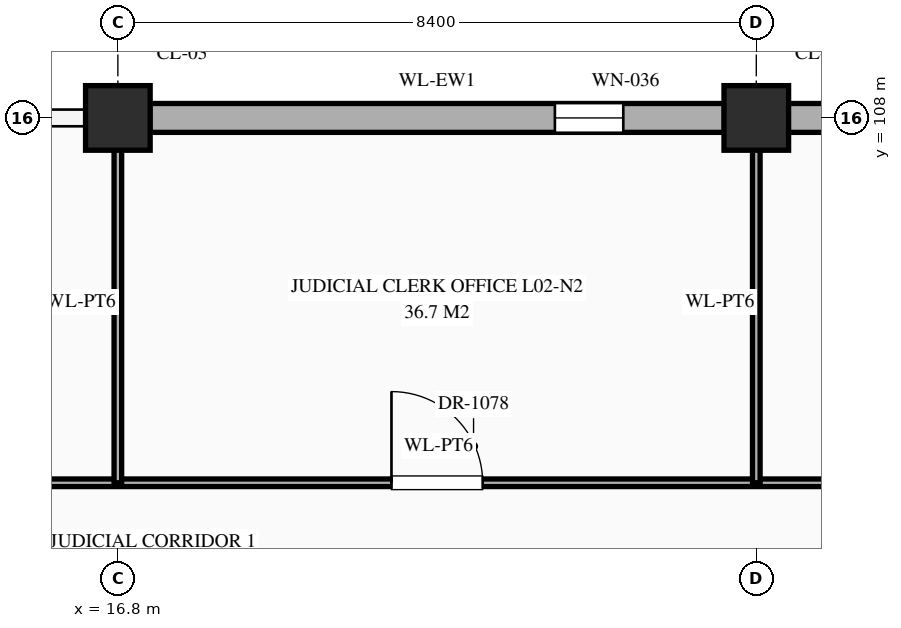
"""IFC4 building model, lengths in metres.
Left out: names, types, materials, properties, quantities, classifications, styles, units other than length and angle.
Written with IfcOpenShell. Run it as: python <this file> out.ifc"""

import sys

from ifc_helpers import new_model, si_unit, direction, frame, frame_2d, origin, origin_2d, place, context, subcontext, project, spatial, rectangle, extrude, element, fill, save


model = new_model("IFC4")
c1 = context("Model", 3, precision=1e-05, world=origin(), true_north=direction((0.0, 1.0)))
c2 = subcontext(c1, "Body", "Model", "MODEL_VIEW")
j1 = project(units=[si_unit("LENGTHUNIT", "METRE"), si_unit("PLANEANGLEUNIT", "RADIAN")], contexts=[c1])
p1 = place(None, origin())
s1 = spatial("IfcSite", under=j1, at=p1, CompositionType="ELEMENT")
p2 = place(p1, origin())
s2 = spatial("IfcBuilding", under=s1, at=p2, CompositionType="ELEMENT")
p3 = place(p2, frame((0.0, 0.0, 5.4)))
s3 = spatial("IfcBuildingStorey", under=s2, at=p3, CompositionType="ELEMENT", Elevation=5.4)
for number, where, z_axis, x_axis in (
    (1, (16.8, 108.0, 0.0), (0.0, 0.0, 1.0), (1.0, 0.0, 0.0)),
    (2, (25.2, 108.0, 0.0), (0.0, 0.0, 1.0), (1.0, 0.0, 0.0)),
):
    element("IfcColumn", number, at=place(p3, frame(where, z_axis=z_axis, x_axis=x_axis)), inside=s3, PredefinedType="COLUMN", context=c2, shape_type="SweptSolid", body=[
        extrude(rectangle(XDim=0.85, YDim=0.85, at=origin_2d()), origin(), (0.0, 0.0, 1.0), 5.4),
    ])
p4 = place(p3, frame((17.22, 108.0, 0.0), z_axis=(0.0, 0.0, 1.0), x_axis=(1.0, 0.0, 0.0)))
e3 = element("IfcWall", 3, at=p4, inside=s3, PredefinedType="STANDARD", context=c2, shape_type="SweptSolid", body=[
    extrude(rectangle(XDim=7.56, YDim=0.38, at=frame_2d((3.78, 0.0))), origin(), (0.0, 0.0, 1.0), 4.47),
])
p5 = place(p4, frame((5.33, 0.0, 0.85)))
e4 = element("IfcOpeningElement", 4, at=p5, cuts=e3, PredefinedType="OPENING", context=c2, shape_type="SweptSolid", body=[
    extrude(rectangle(XDim=0.9, YDim=1.2, at=frame_2d((0.45, 0.6))), frame((0.0, 0.202, 0.0), z_axis=(0.0, -1.0, 0.0), x_axis=(1.0, 0.0, 0.0)), (0.0, 0.0, 1.0), 0.404),
])
p6 = place(p3, frame((25.62, 108.0, 0.0), z_axis=(0.0, 0.0, 1.0), x_axis=(1.0, 0.0, 0.0)))
e5 = element("IfcWall", 5, at=p6, inside=s3, PredefinedType="STANDARD", context=c2, shape_type="SweptSolid", body=[
    extrude(rectangle(XDim=7.56, YDim=0.38, at=frame_2d((3.78, 0.0))), origin(), (0.0, 0.0, 1.0), 4.47),
])
p7 = place(p6, frame((5.33, 0.0, 0.85)))
e6 = element("IfcOpeningElement", 6, at=p7, cuts=e5, PredefinedType="OPENING", context=c2, shape_type="SweptSolid", body=[
    extrude(rectangle(XDim=0.9, YDim=1.38, at=frame_2d((0.45, 0.69))), frame((0.0, 0.202, 0.0), z_axis=(0.0, -1.0, 0.0), x_axis=(1.0, 0.0, 0.0)), (0.0, 0.0, 1.0), 0.404),
])
p8 = place(p3, frame((0.04, 103.2, 0.0), z_axis=(0.0, 0.0, 1.0), x_axis=(1.0, 0.0, 0.0)))
e7 = element("IfcWall", 7, at=p8, inside=s3, PredefinedType="STANDARD", context=c2, shape_type="SweptSolid", body=[
    extrude(rectangle(XDim=41.96, YDim=0.1, at=frame_2d((20.98, 0.0))), origin(), (0.0, 0.0, 1.0), 5.12),
])
p9 = place(p8, frame((3.62, 0.0, 0.0)))
e8 = element("IfcOpeningElement", 8, at=p9, cuts=e7, PredefinedType="OPENING", context=c2, shape_type="SweptSolid", body=[
    extrude(rectangle(XDim=1.12, YDim=2.25, at=frame_2d((0.56, 1.125))), frame((0.0, 0.062, 0.0), z_axis=(0.0, -1.0, 0.0), x_axis=(1.0, 0.0, 0.0)), (0.0, 0.0, 1.0), 0.124),
])
p10 = place(p8, frame((11.98, 0.0, 0.0)))
e9 = element("IfcOpeningElement", 9, at=p10, cuts=e7, PredefinedType="OPENING", context=c2, shape_type="SweptSolid", body=[
    extrude(rectangle(XDim=1.16, YDim=2.3, at=frame_2d((0.58, 1.15))), frame((0.0, 0.062, 0.0), z_axis=(0.0, -1.0, 0.0), x_axis=(1.0, 0.0, 0.0)), (0.0, 0.0, 1.0), 0.124),
])
p11 = place(p8, frame((20.36, 0.0, 0.0)))
e10 = element("IfcOpeningElement", 10, at=p11, cuts=e7, PredefinedType="OPENING", context=c2, shape_type="SweptSolid", body=[
    extrude(rectangle(XDim=1.2, YDim=2.35, at=frame_2d((0.6, 1.175))), frame((0.0, 0.062, 0.0), z_axis=(0.0, -1.0, 0.0), x_axis=(1.0, 0.0, 0.0)), (0.0, 0.0, 1.0), 0.124),
])
p12 = place(p8, frame((28.74, 0.0, 0.0)))
e11 = element("IfcOpeningElement", 11, at=p12, cuts=e7, PredefinedType="OPENING", context=c2, shape_type="SweptSolid", body=[
    extrude(rectangle(XDim=1.24, YDim=2.3, at=frame_2d((0.62, 1.15))), frame((0.0, 0.062, 0.0), z_axis=(0.0, -1.0, 0.0), x_axis=(1.0, 0.0, 0.0)), (0.0, 0.0, 1.0), 0.124),
])
p13 = place(p8, frame((37.12, 0.0, 0.0)))
e12 = element("IfcOpeningElement", 12, at=p13, cuts=e7, PredefinedType="OPENING", context=c2, shape_type="SweptSolid", body=[
    extrude(rectangle(XDim=1.28, YDim=2.35, at=frame_2d((0.64, 1.175))), frame((0.0, 0.062, 0.0), z_axis=(0.0, -1.0, 0.0), x_axis=(1.0, 0.0, 0.0)), (0.0, 0.0, 1.0), 0.124),
])
for number, where, z_axis, x_axis in (
    (13, (16.8, 103.2, 0.0), (0.0, 0.0, 1.0), (0.0, 1.0, 0.0)),
    (14, (25.2, 103.2, 0.0), (0.0, 0.0, 1.0), (0.0, 1.0, 0.0)),
):
    element("IfcWall", number, at=place(p3, frame(where, z_axis=z_axis, x_axis=x_axis)), inside=s3, PredefinedType="STANDARD", context=c2, shape_type="SweptSolid", body=[
        extrude(rectangle(XDim=4.76, YDim=0.1, at=frame_2d((2.38, 0.0))), origin(), (0.0, 0.0, 1.0), 4.37),
    ])
p14 = place(p5, origin())
e15 = element("IfcWindow", 15, at=p14, inside=s3, PartitioningType="SINGLE_PANEL", PredefinedType="WINDOW", context=c2, shape_type="SweptSolid", body=[
    extrude(rectangle(XDim=0.9, YDim=1.2, at=frame_2d((0.45, 0.6))), frame((0.0, 0.03, 0.0), z_axis=(0.0, -1.0, 0.0), x_axis=(1.0, 0.0, 0.0)), (0.0, 0.0, 1.0), 0.06),
])
fill(e4, e15)
p15 = place(p11, origin())
e16 = element("IfcDoor", 16, at=p15, inside=s3, OperationType="SINGLE_SWING_LEFT", PredefinedType="DOOR", context=c2, shape_type="SweptSolid", body=[
    extrude(rectangle(XDim=1.2, YDim=2.35, at=frame_2d((0.6, 1.175))), frame((0.0, 0.025, 0.0), z_axis=(0.0, -1.0, 0.0), x_axis=(1.0, 0.0, 0.0)), (0.0, 0.0, 1.0), 0.05),
])
fill(e10, e16)
save(model, sys.argv[1])
